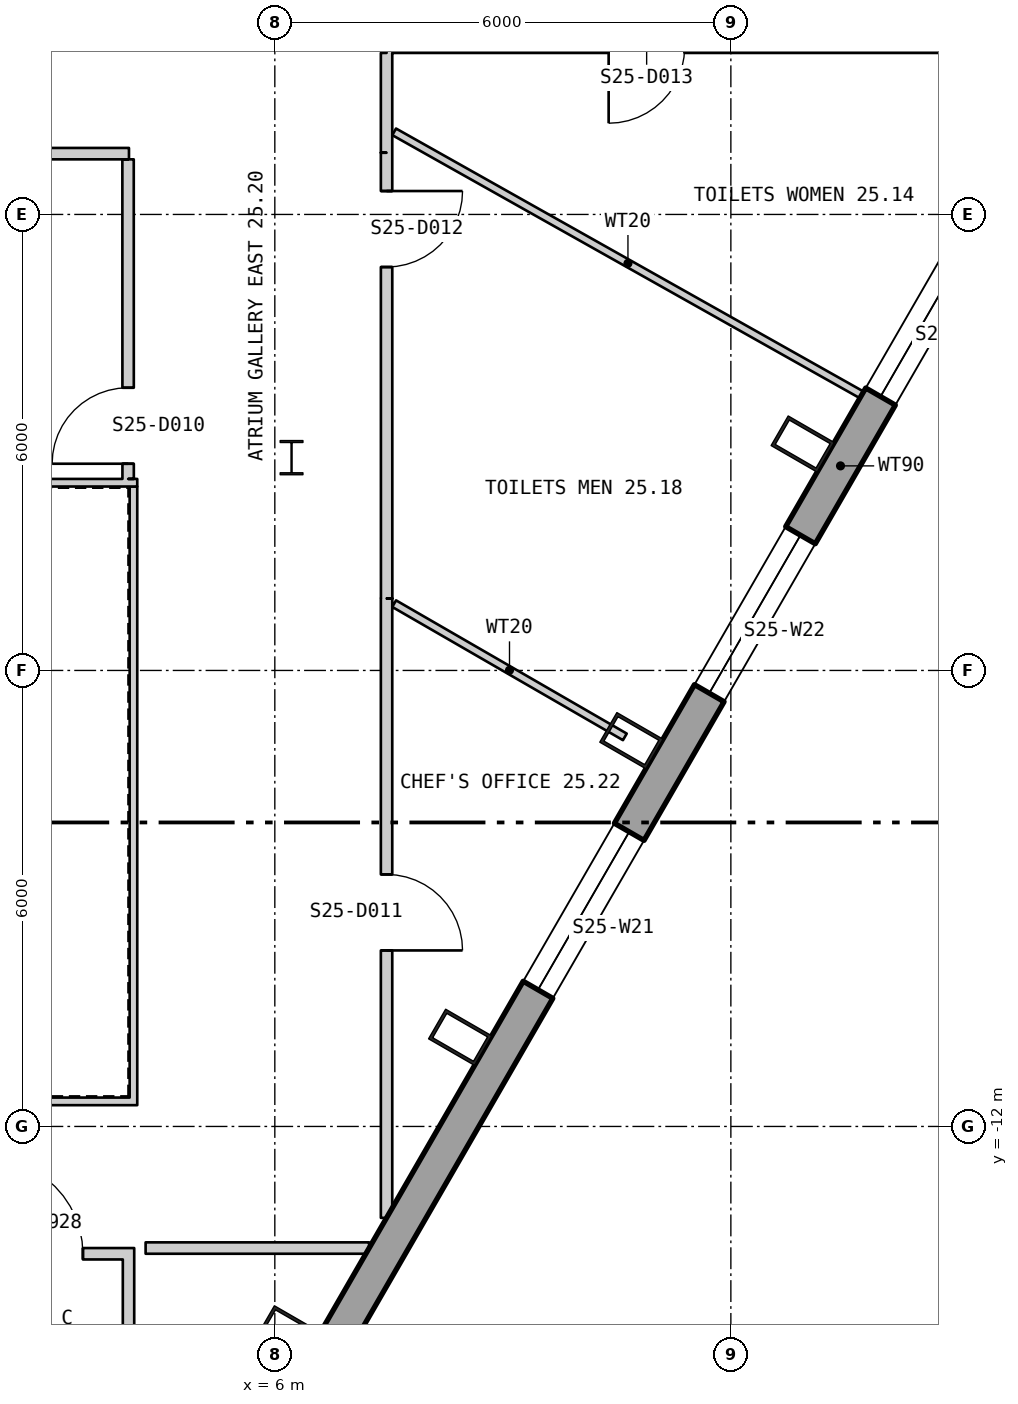
"""IFC4 building model, lengths in metres.
Left out: names, types, materials, properties, quantities, classifications, styles, units other than length and angle.
Written with IfcOpenShell. Run it as: python <this file> out.ifc"""

import sys

from ifc_helpers import new_model, si_unit, direction, frame, frame_2d, origin, origin_2d, place, context, subcontext, project, spatial, polyline, rectangle, hollow_rectangle, i_section, outline, extrude, element, fill, save


model = new_model("IFC4")
c1 = context("Model", 3, precision=1e-05, world=origin(), true_north=direction((0.0, 1.0)))
c2 = subcontext(c1, "Body", "Model", "MODEL_VIEW")
j1 = project(units=[si_unit("LENGTHUNIT", "METRE"), si_unit("PLANEANGLEUNIT", "RADIAN")], contexts=[c1])
p1 = place(None, origin())
s1 = spatial("IfcSite", under=j1, at=p1, CompositionType="ELEMENT")
p2 = place(p1, origin())
s2 = spatial("IfcBuilding", under=s1, at=p2, CompositionType="ELEMENT")
p3 = place(p2, frame((0.0, 0.0, 321.0)))
s3 = spatial("IfcBuildingStorey", under=s2, at=p3, CompositionType="ELEMENT", Elevation=321.0)
for number, where, z_axis, x_axis in (
    (1, (6.185, -14.729, 0.0), (0.0, 0.0, 1.0), (0.5, 0.866, 0.0)),
    (2, (8.438, -10.827, 0.0), (0.0, 0.0, 1.0), (0.5, 0.866, 0.0)),
    (3, (10.691, -6.924, 0.0), (0.0, 0.0, 1.0), (0.5, 0.866, 0.0)),
    (4, (12.945, -3.021, 0.0), (0.0, 0.0, 1.0), (0.5, 0.866, 0.0)),
):
    element("IfcColumn", number, at=place(p3, frame(where, z_axis=z_axis, x_axis=x_axis)), inside=s3, PredefinedType="COLUMN", context=c2, shape_type="SweptSolid", body=[
        extrude(hollow_rectangle(XDim=0.45, YDim=0.7, WallThickness=0.04, at=origin_2d()), origin(), (0.0, 0.0, 1.0), 4.2),
    ])
p4 = place(p3, frame((6.22, -3.2, 0.0), z_axis=(0.0, 0.0, 1.0), x_axis=(1.0, 0.0, 0.0)))
e5 = element("IfcColumn", 5, at=p4, inside=s3, PredefinedType="COLUMN", context=c2, shape_type="SweptSolid", body=[
    extrude(i_section(OverallWidth=0.3, OverallDepth=0.45, WebThickness=0.014, FlangeThickness=0.026, at=origin_2d()), origin(), (0.0, 0.0, 1.0), 4.2),
])
p5 = place(p3, frame((2.01, -23.11, -0.18), z_axis=(0.0, 0.0, 1.0), x_axis=(0.500000141277, 0.866025322218, 0.0)))
e6 = element("IfcWall", 6, at=p5, inside=s3, PredefinedType="SOLIDWALL", context=c2, shape_type="SweptSolid", body=[
    extrude(outline(polyline([(-0.13, -0.225), (45.86, -0.225), (45.6, 0.225), (0.13, 0.225), (-0.13, -0.225)])), origin(), (0.0, 0.0, 1.0), 3.98),
])
p6 = place(p5, frame((1.424, 0.0, 1.08)))
e7 = element("IfcOpeningElement", 7, at=p6, cuts=e6, PredefinedType="OPENING", context=c2, shape_type="SweptSolid", body=[
    extrude(rectangle(XDim=2.4, YDim=2.3, at=frame_2d((1.2, 1.15))), frame((0.0, 0.235, 0.0), z_axis=(0.0, -1.0, 0.0), x_axis=(1.0, 0.0, 0.0)), (0.0, 0.0, 1.0), 0.47),
])
p7 = place(p5, frame((5.892, 0.0, 1.08)))
e8 = element("IfcOpeningElement", 8, at=p7, cuts=e6, PredefinedType="OPENING", context=c2, shape_type="SweptSolid", body=[
    extrude(rectangle(XDim=2.4, YDim=2.3, at=frame_2d((1.2, 1.15))), frame((0.0, 0.235, 0.0), z_axis=(0.0, -1.0, 0.0), x_axis=(1.0, 0.0, 0.0)), (0.0, 0.0, 1.0), 0.47),
])
p8 = place(p5, frame((14.905, 0.0, 1.08)))
e9 = element("IfcOpeningElement", 9, at=p8, cuts=e6, PredefinedType="OPENING", context=c2, shape_type="SweptSolid", body=[
    extrude(rectangle(XDim=2.4, YDim=2.3, at=frame_2d((1.2, 1.15))), frame((0.0, 0.235, 0.0), z_axis=(0.0, -1.0, 0.0), x_axis=(1.0, 0.0, 0.0)), (0.0, 0.0, 1.0), 0.47),
])
p9 = place(p5, frame((19.412, 0.0, 1.08)))
e10 = element("IfcOpeningElement", 10, at=p9, cuts=e6, PredefinedType="OPENING", context=c2, shape_type="SweptSolid", body=[
    extrude(rectangle(XDim=2.4, YDim=2.3, at=frame_2d((1.2, 1.15))), frame((0.0, 0.235, 0.0), z_axis=(0.0, -1.0, 0.0), x_axis=(1.0, 0.0, 0.0)), (0.0, 0.0, 1.0), 0.47),
])
p10 = place(p5, frame((23.918, 0.0, 1.08)))
e11 = element("IfcOpeningElement", 11, at=p10, cuts=e6, PredefinedType="OPENING", context=c2, shape_type="SweptSolid", body=[
    extrude(rectangle(XDim=2.4, YDim=2.3, at=frame_2d((1.2, 1.15))), frame((0.0, 0.235, 0.0), z_axis=(0.0, -1.0, 0.0), x_axis=(1.0, 0.0, 0.0)), (0.0, 0.0, 1.0), 0.47),
])
p11 = place(p5, frame((28.425, 0.0, 1.08)))
e12 = element("IfcOpeningElement", 12, at=p11, cuts=e6, PredefinedType="OPENING", context=c2, shape_type="SweptSolid", body=[
    extrude(rectangle(XDim=2.4, YDim=2.3, at=frame_2d((1.2, 1.15))), frame((0.0, 0.235, 0.0), z_axis=(0.0, -1.0, 0.0), x_axis=(1.0, 0.0, 0.0)), (0.0, 0.0, 1.0), 0.47),
])
p12 = place(p5, frame((37.438, 0.0, 1.08)))
e13 = element("IfcOpeningElement", 13, at=p12, cuts=e6, PredefinedType="OPENING", context=c2, shape_type="SweptSolid", body=[
    extrude(rectangle(XDim=2.4, YDim=2.3, at=frame_2d((1.2, 1.15))), frame((0.0, 0.235, 0.0), z_axis=(0.0, -1.0, 0.0), x_axis=(1.0, 0.0, 0.0)), (0.0, 0.0, 1.0), 0.47),
])
p13 = place(p5, frame((41.907, 0.0, 1.08)))
e14 = element("IfcOpeningElement", 14, at=p13, cuts=e6, PredefinedType="OPENING", context=c2, shape_type="SweptSolid", body=[
    extrude(rectangle(XDim=2.4, YDim=2.3, at=frame_2d((1.2, 1.15))), frame((0.0, 0.235, 0.0), z_axis=(0.0, -1.0, 0.0), x_axis=(1.0, 0.0, 0.0)), (0.0, 0.0, 1.0), 0.47),
])
p14 = place(p3, frame((-4.19, -11.67, 0.0), z_axis=(0.0, 0.0, 1.0), x_axis=(1.0, 0.0, 0.0)))
e15 = element("IfcWall", 15, at=p14, inside=s3, PredefinedType="PARTITIONING", context=c2, shape_type="SweptSolid", body=[
    extrude(rectangle(XDim=8.38, YDim=0.1, at=frame_2d((4.19, 0.0))), origin(), (0.0, 0.0, 1.0), 4.0),
])
p15 = place(p3, frame((4.14, -11.62, 0.0), z_axis=(0.0, 0.0, 1.0), x_axis=(0.0, 1.0, 0.0)))
e16 = element("IfcWall", 16, at=p15, inside=s3, PredefinedType="PARTITIONING", context=c2, shape_type="SweptSolid", body=[
    extrude(rectangle(XDim=8.04, YDim=0.1, at=frame_2d((4.02, 0.0))), origin(), (0.0, 0.0, 1.0), 4.0),
])
p16 = place(p3, frame((4.19, -3.53, 0.0), z_axis=(0.0, 0.0, 1.0), x_axis=(-1.0, 0.0, 0.0)))
e17 = element("IfcWall", 17, at=p16, inside=s3, PredefinedType="PARTITIONING", context=c2, shape_type="SweptSolid", body=[
    extrude(rectangle(XDim=8.38, YDim=0.1, at=frame_2d((4.19, 0.0))), origin(), (0.0, 0.0, 1.0), 4.0),
])
p17 = place(p3, frame((4.075, -16.15, 0.0), z_axis=(0.0, 0.0, 1.0), x_axis=(0.0, 1.0, 0.0)))
e18 = element("IfcWall", 18, at=p17, inside=s3, PredefinedType="PARTITIONING", context=c2, shape_type="SweptSolid", body=[
    extrude(rectangle(XDim=2.4, YDim=0.15, at=frame_2d((1.2, 0.0))), origin(), (0.0, 0.0, 1.0), 4.0),
])
p18 = place(p3, frame((1.55, -13.675, 0.0), z_axis=(0.0, 0.0, 1.0), x_axis=(1.0, 0.0, 0.0)))
e19 = element("IfcWall", 19, at=p18, inside=s3, PredefinedType="PARTITIONING", context=c2, shape_type="SweptSolid", body=[
    extrude(rectangle(XDim=2.6, YDim=0.15, at=frame_2d((1.3, 0.0))), origin(), (0.0, 0.0, 1.0), 3.21),
])
p19 = place(p18, frame((0.675, 0.0, 0.0)))
e20 = element("IfcOpeningElement", 20, at=p19, cuts=e19, PredefinedType="OPENING", context=c2, shape_type="SweptSolid", body=[
    extrude(rectangle(XDim=1.25, YDim=2.1, at=frame_2d((0.625, 1.05))), frame((0.0, 0.085, 0.0), z_axis=(0.0, -1.0, 0.0), x_axis=(1.0, 0.0, 0.0)), (0.0, 0.0, 1.0), 0.17),
])
p20 = place(p3, frame((-4.082, 0.8, 0.0), z_axis=(0.0, 0.0, 1.0), x_axis=(1.0, 0.0, 0.0)))
e21 = element("IfcWall", 21, at=p20, inside=s3, PredefinedType="PARTITIONING", context=c2, shape_type="SweptSolid", body=[
    extrude(rectangle(XDim=8.163, YDim=0.15, at=frame_2d((4.082, 0.0))), origin(), (0.0, 0.0, 1.0), 4.0),
])
p21 = place(p3, frame((4.069, 0.725, 0.0), z_axis=(0.0, 0.0, 1.0), x_axis=(0.000237812122, -0.999999971723, 0.0)))
e22 = element("IfcWall", 22, at=p21, inside=s3, PredefinedType="PARTITIONING", context=c2, shape_type="SweptSolid", body=[
    extrude(rectangle(XDim=4.205, YDim=0.15, at=frame_2d((2.103, 0.0))), origin(), (0.0, 0.0, 1.0), 4.0),
])
p22 = place(p21, frame((3.005, 0.0, 0.0)))
e23 = element("IfcOpeningElement", 23, at=p22, cuts=e22, PredefinedType="OPENING", context=c2, shape_type="SweptSolid", body=[
    extrude(rectangle(XDim=1.0, YDim=2.1, at=frame_2d((0.5, 1.05))), frame((0.0, 0.085, 0.0), z_axis=(0.0, -1.0, 0.0), x_axis=(1.0, 0.0, 0.0)), (0.0, 0.0, 1.0), 0.17),
])
p23 = place(p3, frame((4.3, -13.6, 0.0), z_axis=(0.0, 0.0, 1.0), x_axis=(1.0, 0.0, 0.0)))
e24 = element("IfcWall", 24, at=p23, inside=s3, PredefinedType="PARTITIONING", context=c2, shape_type="SweptSolid", body=[
    extrude(rectangle(XDim=2.335, YDim=0.15, at=frame_2d((1.167, 0.0))), origin(), (0.0, 0.0, 1.0), 3.21),
])
p24 = place(p3, frame((6.635, -13.6, 0.0), z_axis=(0.0, 0.0, 1.0), x_axis=(1.0, 0.0, 0.0)))
e25 = element("IfcWall", 25, at=p24, inside=s3, PredefinedType="PARTITIONING", context=c2, shape_type="SweptSolid", body=[
    extrude(rectangle(XDim=0.606, YDim=0.15, at=frame_2d((0.303, 0.0))), origin(), (0.0, 0.0, 1.0), 4.0),
])
p25 = place(p3, frame((7.47, -13.203, 0.0), z_axis=(0.0, 0.0, 1.0), x_axis=(0.0, 1.0, 0.0)))
e26 = element("IfcWall", 26, at=p25, inside=s3, PredefinedType="PARTITIONING", context=c2, shape_type="SweptSolid", body=[
    extrude(rectangle(XDim=8.15, YDim=0.15, at=frame_2d((4.075, 0.0))), origin(), (0.0, 0.0, 1.0), 4.0),
])
p26 = place(p25, frame((3.519, 0.0, 0.0)))
e27 = element("IfcOpeningElement", 27, at=p26, cuts=e26, PredefinedType="OPENING", context=c2, shape_type="SweptSolid", body=[
    extrude(rectangle(XDim=1.0, YDim=2.1, at=frame_2d((0.5, 1.05))), frame((0.0, 0.085, 0.0), z_axis=(0.0, -1.0, 0.0), x_axis=(1.0, 0.0, 0.0)), (0.0, 0.0, 1.0), 0.17),
])
p27 = place(p3, frame((7.47, 0.812, 0.0), z_axis=(0.0, 0.0, 1.0), x_axis=(0.000170502981, -0.999999985464, 0.0)))
e28 = element("IfcWall", 28, at=p27, inside=s3, PredefinedType="PARTITIONING", context=c2, shape_type="SweptSolid", body=[
    extrude(rectangle(XDim=5.865, YDim=0.15, at=frame_2d((2.933, 0.0))), origin(), (0.0, 0.0, 1.0), 4.0),
])
p28 = place(p27, frame((0.504, 0.0, 0.0)))
e29 = element("IfcOpeningElement", 29, at=p28, cuts=e28, PredefinedType="OPENING", context=c2, shape_type="SweptSolid", body=[
    extrude(rectangle(XDim=1.0, YDim=2.1, at=frame_2d((0.5, 1.05))), frame((0.0, 0.085, 0.0), z_axis=(0.0, -1.0, 0.0), x_axis=(1.0, 0.0, 0.0)), (0.0, 0.0, 1.0), 0.17),
])
p29 = place(p3, frame((7.47, 0.812, 0.0), z_axis=(0.0, 0.0, 1.0), x_axis=(0.0, 1.0, 0.0)))
e30 = element("IfcWall", 30, at=p29, inside=s3, PredefinedType="PARTITIONING", context=c2, shape_type="SweptSolid", body=[
    extrude(rectangle(XDim=1.313, YDim=0.15, at=frame_2d((0.656, 0.0))), origin(), (0.0, 0.0, 1.0), 4.0),
])
p30 = place(p3, frame((7.47, 2.2, 0.0), z_axis=(0.0, 0.0, 1.0), x_axis=(1.0, 0.0, 0.0)))
e31 = element("IfcWall", 31, at=p30, inside=s3, PredefinedType="PARTITIONING", context=c2, shape_type="SweptSolid", body=[
    extrude(rectangle(XDim=8.755, YDim=0.15, at=frame_2d((4.378, 0.0))), origin(), (0.0, 0.0, 1.0), 4.0),
])
p31 = place(p30, frame((2.922, 0.0, 0.0)))
e32 = element("IfcOpeningElement", 32, at=p31, cuts=e31, PredefinedType="OPENING", context=c2, shape_type="SweptSolid", body=[
    extrude(rectangle(XDim=1.0, YDim=2.1, at=frame_2d((0.5, 1.05))), frame((0.0, 0.085, 0.0), z_axis=(0.0, -1.0, 0.0), x_axis=(1.0, 0.0, 0.0)), (0.0, 0.0, 1.0), 0.17),
])
p32 = place(p3, frame((7.57, 1.087, 0.0), z_axis=(0.0, 0.0, 1.0), x_axis=(0.871545267987, -0.490315047546, 0.0)))
e33 = element("IfcWall", 33, at=p32, inside=s3, PredefinedType="PARTITIONING", context=c2, shape_type="SweptSolid", body=[
    extrude(rectangle(XDim=7.059, YDim=0.1, at=frame_2d((3.529, 0.0))), origin(), (0.0, 0.0, 1.0), 4.0),
])
p33 = place(p3, frame((7.57, -5.121, 0.0), z_axis=(0.0, 0.0, 1.0), x_axis=(0.865933726818, -0.500158755556, 0.0)))
e34 = element("IfcWall", 34, at=p33, inside=s3, PredefinedType="PARTITIONING", context=c2, shape_type="SweptSolid", body=[
    extrude(rectangle(XDim=3.505, YDim=0.1, at=frame_2d((1.752, 0.0))), origin(), (0.0, 0.0, 1.0), 4.0),
])
p34 = place(p8, origin())
e35 = element("IfcWindow", 35, at=p34, inside=s3, PartitioningType="SINGLE_PANEL", PredefinedType="WINDOW", context=c2, shape_type="SweptSolid", body=[
    extrude(rectangle(XDim=2.4, YDim=2.3, at=frame_2d((1.2, 1.15))), frame((0.0, 0.105, 0.0), z_axis=(0.0, -1.0, 0.0), x_axis=(1.0, 0.0, 0.0)), (0.0, 0.0, 1.0), 0.06),
])
fill(e9, e35)
p35 = place(p9, origin())
e36 = element("IfcWindow", 36, at=p35, inside=s3, PartitioningType="SINGLE_PANEL", PredefinedType="WINDOW", context=c2, shape_type="SweptSolid", body=[
    extrude(rectangle(XDim=2.4, YDim=2.3, at=frame_2d((1.2, 1.15))), frame((0.0, 0.105, 0.0), z_axis=(0.0, -1.0, 0.0), x_axis=(1.0, 0.0, 0.0)), (0.0, 0.0, 1.0), 0.06),
])
fill(e10, e36)
p36 = place(p10, origin())
e37 = element("IfcWindow", 37, at=p36, inside=s3, PartitioningType="SINGLE_PANEL", PredefinedType="WINDOW", context=c2, shape_type="SweptSolid", body=[
    extrude(rectangle(XDim=2.4, YDim=2.3, at=frame_2d((1.2, 1.15))), frame((0.0, 0.105, 0.0), z_axis=(0.0, -1.0, 0.0), x_axis=(1.0, 0.0, 0.0)), (0.0, 0.0, 1.0), 0.06),
])
fill(e11, e37)
p37 = place(p19, origin())
e38 = element("IfcDoor", 38, at=p37, inside=s3, OperationType="SINGLE_SWING_RIGHT", PredefinedType="DOOR", context=c2, shape_type="SweptSolid", body=[
    extrude(rectangle(XDim=1.25, YDim=2.1, at=frame_2d((0.625, 1.05))), frame((0.0, 0.025, 0.0), z_axis=(0.0, -1.0, 0.0), x_axis=(1.0, 0.0, 0.0)), (0.0, 0.0, 1.0), 0.05),
])
fill(e20, e38)
p38 = place(p22, origin())
e39 = element("IfcDoor", 39, at=p38, inside=s3, OperationType="SINGLE_SWING_RIGHT", PredefinedType="DOOR", context=c2, shape_type="SweptSolid", body=[
    extrude(rectangle(XDim=1.0, YDim=2.1, at=frame_2d((0.5, 1.05))), frame((0.0, 0.025, 0.0), z_axis=(0.0, -1.0, 0.0), x_axis=(1.0, 0.0, 0.0)), (0.0, 0.0, 1.0), 0.05),
])
fill(e23, e39)
p39 = place(p26, origin())
e40 = element("IfcDoor", 40, at=p39, inside=s3, OperationType="SINGLE_SWING_LEFT", PredefinedType="DOOR", context=c2, shape_type="SweptSolid", body=[
    extrude(rectangle(XDim=1.0, YDim=2.1, at=frame_2d((0.5, 1.05))), frame((0.0, 0.025, 0.0), z_axis=(0.0, -1.0, 0.0), x_axis=(1.0, 0.0, 0.0)), (0.0, 0.0, 1.0), 0.05),
])
fill(e27, e40)
p40 = place(p28, origin())
e41 = element("IfcDoor", 41, at=p40, inside=s3, OperationType="SINGLE_SWING_RIGHT", PredefinedType="DOOR", context=c2, shape_type="SweptSolid", body=[
    extrude(rectangle(XDim=1.0, YDim=2.1, at=frame_2d((0.5, 1.05))), frame((0.0, 0.025, 0.0), z_axis=(0.0, -1.0, 0.0), x_axis=(1.0, 0.0, 0.0)), (0.0, 0.0, 1.0), 0.05),
])
fill(e29, e41)
save(model, sys.argv[1])
